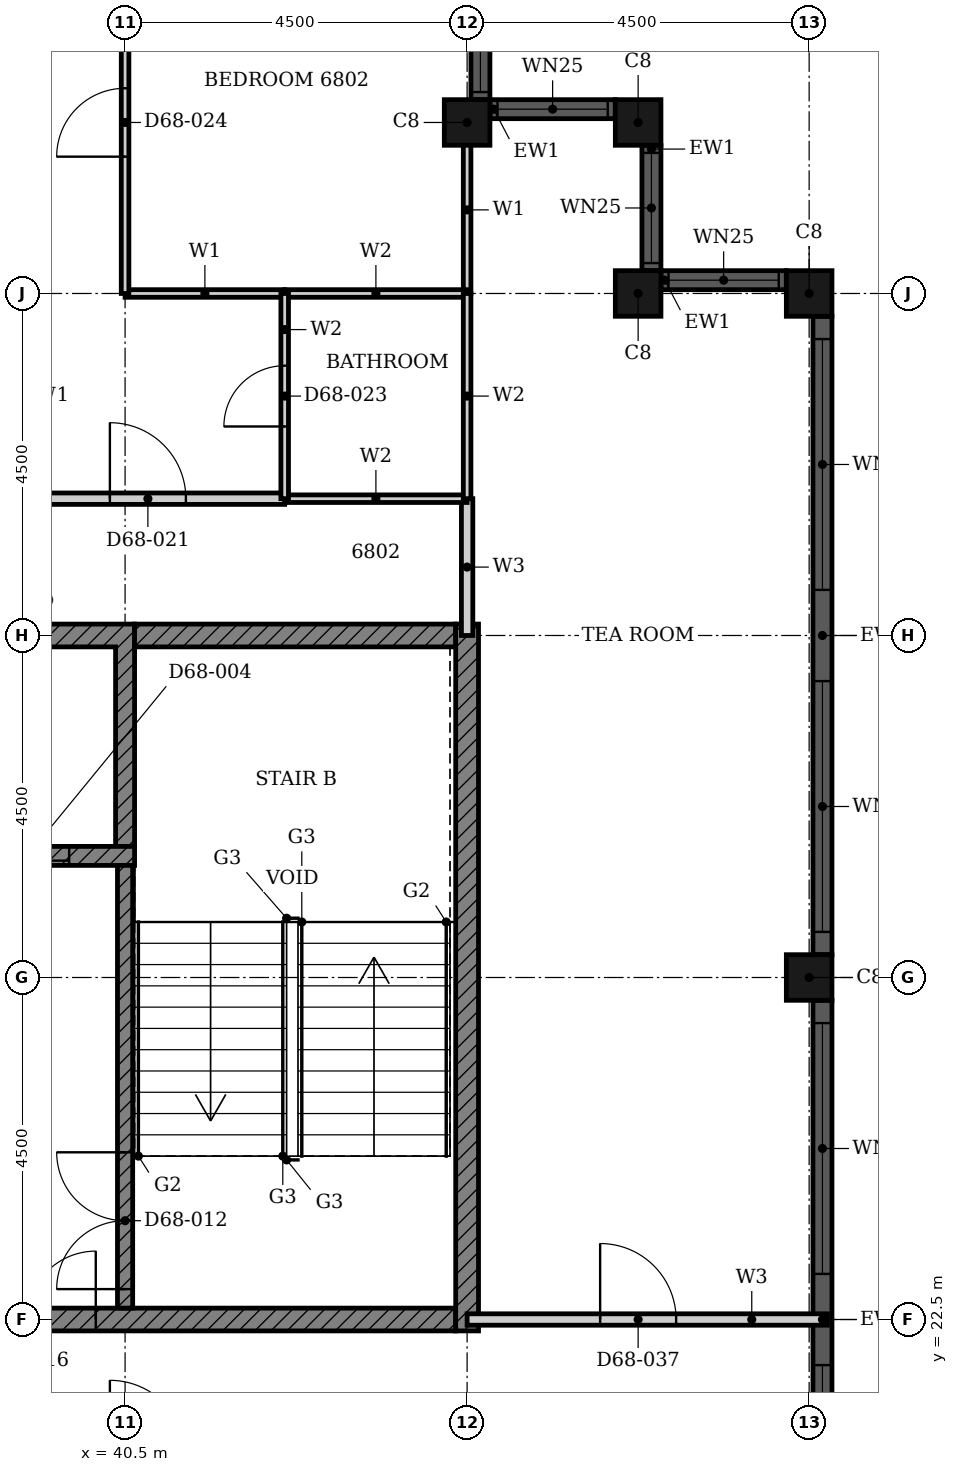
"""IFC4 building model, lengths in metres.
Left out: names, types, materials, properties, quantities, classifications, styles, units other than length and angle.
Written with IfcOpenShell. Run it as: python <this file> out.ifc"""

import sys

from ifc_helpers import new_model, si_unit, direction, frame, frame_2d, origin, origin_2d, place, context, subcontext, project, spatial, polyline, rectangle, hollow_rectangle, outline, extrude, element, fill, save


model = new_model("IFC4")
c1 = context("Model", 3, precision=1e-05, world=origin(), true_north=direction((0.0, 1.0)))
c2 = subcontext(c1, "Body", "Model", "MODEL_VIEW")
j1 = project(units=[si_unit("LENGTHUNIT", "METRE"), si_unit("PLANEANGLEUNIT", "RADIAN")], contexts=[c1])
p1 = place(None, origin())
s1 = spatial("IfcSite", under=j1, at=p1, CompositionType="ELEMENT")
p2 = place(p1, origin())
s2 = spatial("IfcBuilding", under=s1, at=p2, CompositionType="ELEMENT")
p3 = place(p2, frame((0.0, 0.0, 267.5)))
s3 = spatial("IfcBuildingStorey", under=s2, at=p3, CompositionType="ELEMENT", Elevation=267.5)
for number, where, z_axis, x_axis in (
    (1, (49.5, 27.0, 0.0), (0.0, 0.0, 1.0), (1.0, 0.0, 0.0)),
    (2, (49.5, 36.0, 0.0), (0.0, 0.0, 1.0), (1.0, 0.0, 0.0)),
    (3, (47.25, 36.0, 0.0), (0.0, 0.0, 1.0), (1.0, 0.0, 0.0)),
    (4, (47.25, 38.25, 0.0), (0.0, 0.0, 1.0), (1.0, 0.0, 0.0)),
    (5, (45.0, 38.25, 0.0), (0.0, 0.0, 1.0), (1.0, 0.0, 0.0)),
):
    element("IfcColumn", number, at=place(p3, frame(where, z_axis=z_axis, x_axis=x_axis)), inside=s3, PredefinedType="COLUMN", context=c2, shape_type="SweptSolid", body=[
        extrude(hollow_rectangle(XDim=0.6, YDim=0.6, WallThickness=0.02, at=origin_2d()), origin(), (0.0, 0.0, 1.0), 3.7),
    ])
p4 = place(p3, frame((49.675, 18.3, 0.0), z_axis=(0.0, 0.0, 1.0), x_axis=(0.0, 1.0, 0.0)))
e6 = element("IfcWall", 6, at=p4, inside=s3, PredefinedType="SOLIDWALL", context=c2, shape_type="SweptSolid", body=[
    extrude(rectangle(XDim=8.4, YDim=0.25, at=frame_2d((4.2, 0.0))), origin(), (0.0, 0.0, 1.0), 3.7),
])
p5 = place(p4, frame((0.3, 0.0, 0.45)))
e7 = element("IfcOpeningElement", 7, at=p5, cuts=e6, PredefinedType="OPENING", context=c2, shape_type="SweptSolid", body=[
    extrude(rectangle(XDim=3.3, YDim=2.3, at=frame_2d((1.65, 1.15))), frame((0.0, 0.135, 0.0), z_axis=(0.0, -1.0, 0.0), x_axis=(1.0, 0.0, 0.0)), (0.0, 0.0, 1.0), 0.27),
])
p6 = place(p4, frame((4.8, 0.0, 0.45)))
e8 = element("IfcOpeningElement", 8, at=p6, cuts=e6, PredefinedType="OPENING", context=c2, shape_type="SweptSolid", body=[
    extrude(rectangle(XDim=3.3, YDim=2.3, at=frame_2d((1.65, 1.15))), frame((0.0, 0.135, 0.0), z_axis=(0.0, -1.0, 0.0), x_axis=(1.0, 0.0, 0.0)), (0.0, 0.0, 1.0), 0.27),
])
p7 = place(p3, frame((49.675, 27.3, 0.0), z_axis=(0.0, 0.0, 1.0), x_axis=(0.0, 1.0, 0.0)))
e9 = element("IfcWall", 9, at=p7, inside=s3, PredefinedType="SOLIDWALL", context=c2, shape_type="SweptSolid", body=[
    extrude(rectangle(XDim=8.4, YDim=0.25, at=frame_2d((4.2, 0.0))), origin(), (0.0, 0.0, 1.0), 3.7),
])
p8 = place(p7, frame((0.3, 0.0, 0.45)))
e10 = element("IfcOpeningElement", 10, at=p8, cuts=e9, PredefinedType="OPENING", context=c2, shape_type="SweptSolid", body=[
    extrude(rectangle(XDim=3.3, YDim=2.3, at=frame_2d((1.65, 1.15))), frame((0.0, 0.135, 0.0), z_axis=(0.0, -1.0, 0.0), x_axis=(1.0, 0.0, 0.0)), (0.0, 0.0, 1.0), 0.27),
])
p9 = place(p7, frame((4.8, 0.0, 0.45)))
e11 = element("IfcOpeningElement", 11, at=p9, cuts=e9, PredefinedType="OPENING", context=c2, shape_type="SweptSolid", body=[
    extrude(rectangle(XDim=3.3, YDim=2.3, at=frame_2d((1.65, 1.15))), frame((0.0, 0.135, 0.0), z_axis=(0.0, -1.0, 0.0), x_axis=(1.0, 0.0, 0.0)), (0.0, 0.0, 1.0), 0.27),
])
p10 = place(p3, frame((49.2, 36.175, 0.0), z_axis=(0.0, 0.0, 1.0), x_axis=(-1.0, 0.0, 0.0)))
e12 = element("IfcWall", 12, at=p10, inside=s3, PredefinedType="SOLIDWALL", context=c2, shape_type="SweptSolid", body=[
    extrude(rectangle(XDim=1.65, YDim=0.25, at=frame_2d((0.825, 0.0))), origin(), (0.0, 0.0, 1.0), 3.7),
])
p11 = place(p10, frame((0.1, 0.0, 0.9)))
e13 = element("IfcOpeningElement", 13, at=p11, cuts=e12, PredefinedType="OPENING", context=c2, shape_type="SweptSolid", body=[
    extrude(rectangle(XDim=1.45, YDim=1.85, at=frame_2d((0.725, 0.925))), frame((0.0, 0.135, 0.0), z_axis=(0.0, -1.0, 0.0), x_axis=(1.0, 0.0, 0.0)), (0.0, 0.0, 1.0), 0.27),
])
p12 = place(p3, frame((47.425, 36.3, 0.0), z_axis=(0.0, 0.0, 1.0), x_axis=(0.0, 1.0, 0.0)))
e14 = element("IfcWall", 14, at=p12, inside=s3, PredefinedType="SOLIDWALL", context=c2, shape_type="SweptSolid", body=[
    extrude(rectangle(XDim=1.65, YDim=0.25, at=frame_2d((0.825, 0.0))), origin(), (0.0, 0.0, 1.0), 3.7),
])
p13 = place(p12, frame((0.1, 0.0, 0.9)))
e15 = element("IfcOpeningElement", 15, at=p13, cuts=e14, PredefinedType="OPENING", context=c2, shape_type="SweptSolid", body=[
    extrude(rectangle(XDim=1.45, YDim=1.85, at=frame_2d((0.725, 0.925))), frame((0.0, 0.135, 0.0), z_axis=(0.0, -1.0, 0.0), x_axis=(1.0, 0.0, 0.0)), (0.0, 0.0, 1.0), 0.27),
])
p14 = place(p3, frame((46.95, 38.425, 0.0), z_axis=(0.0, 0.0, 1.0), x_axis=(-1.0, 0.0, 0.0)))
e16 = element("IfcWall", 16, at=p14, inside=s3, PredefinedType="SOLIDWALL", context=c2, shape_type="SweptSolid", body=[
    extrude(rectangle(XDim=1.65, YDim=0.25, at=frame_2d((0.825, 0.0))), origin(), (0.0, 0.0, 1.0), 3.7),
])
p15 = place(p14, frame((0.1, 0.0, 0.9)))
e17 = element("IfcOpeningElement", 17, at=p15, cuts=e16, PredefinedType="OPENING", context=c2, shape_type="SweptSolid", body=[
    extrude(rectangle(XDim=1.45, YDim=1.85, at=frame_2d((0.725, 0.925))), frame((0.0, 0.135, 0.0), z_axis=(0.0, -1.0, 0.0), x_axis=(1.0, 0.0, 0.0)), (0.0, 0.0, 1.0), 0.27),
])
p16 = place(p3, frame((45.175, 38.55, 0.0), z_axis=(0.0, 0.0, 1.0), x_axis=(0.0, 1.0, 0.0)))
e18 = element("IfcWall", 18, at=p16, inside=s3, PredefinedType="SOLIDWALL", context=c2, shape_type="SweptSolid", body=[
    extrude(rectangle(XDim=1.65, YDim=0.25, at=frame_2d((0.825, 0.0))), origin(), (0.0, 0.0, 1.0), 3.7),
])
p17 = place(p16, frame((0.1, 0.0, 0.9)))
e19 = element("IfcOpeningElement", 19, at=p17, cuts=e18, PredefinedType="OPENING", context=c2, shape_type="SweptSolid", body=[
    extrude(rectangle(XDim=1.45, YDim=1.85, at=frame_2d((0.725, 0.925))), frame((0.0, 0.135, 0.0), z_axis=(0.0, -1.0, 0.0), x_axis=(1.0, 0.0, 0.0)), (0.0, 0.0, 1.0), 0.27),
])
p18 = place(p3, origin())
e20 = element("IfcWall", 20, at=p18, inside=s3, PredefinedType="SHEAR", context=c2, shape_type="SweptSolid", body=[
    extrude(outline(polyline([(37.803, 28.725), (38.053, 28.725), (38.053, 31.35), (40.375, 31.35), (40.375, 28.725), (40.625, 28.725), (40.625, 31.65), (37.803, 31.65), (37.803, 28.725)])), origin(), (0.0, 0.0, 1.0), 3.4),
])
p19 = place(p3, frame((30.339, 22.5, 0.0), z_axis=(0.0, 0.0, 1.0), x_axis=(1.0, 0.0, 0.0)))
e21 = element("IfcWall", 21, at=p19, inside=s3, PredefinedType="SHEAR", context=c2, shape_type="SweptSolid", body=[
    extrude(rectangle(XDim=14.511, YDim=0.3, at=frame_2d((7.255, 0.0))), origin(), (0.0, 0.0, 1.0), 3.4),
])
p20 = place(p19, frame((7.975, 0.0, 0.0)))
e22 = element("IfcOpeningElement", 22, at=p20, cuts=e21, PredefinedType="OPENING", context=c2, shape_type="SweptSolid", body=[
    extrude(rectangle(XDim=1.8, YDim=2.1, at=frame_2d((0.9, 1.05))), frame((0.0, 0.16, 0.0), z_axis=(0.0, -1.0, 0.0), x_axis=(1.0, 0.0, 0.0)), (0.0, 0.0, 1.0), 0.32),
])
p21 = place(p3, frame((40.625, 31.5, 0.0), z_axis=(0.0, 0.0, 1.0), x_axis=(1.0, 0.0, 0.0)))
e23 = element("IfcWall", 23, at=p21, inside=s3, PredefinedType="SHEAR", context=c2, shape_type="SweptSolid", body=[
    extrude(rectangle(XDim=4.225, YDim=0.3, at=frame_2d((2.113, 0.0))), origin(), (0.0, 0.0, 1.0), 3.4),
])
p22 = place(p3, frame((45.0, 22.35, 0.0), z_axis=(0.0, 0.0, 1.0), x_axis=(0.0, 1.0, 0.0)))
e24 = element("IfcWall", 24, at=p22, inside=s3, PredefinedType="SHEAR", context=c2, shape_type="SweptSolid", body=[
    extrude(rectangle(XDim=9.3, YDim=0.3, at=frame_2d((4.65, 0.0))), origin(), (0.0, 0.0, 1.0), 3.4),
])
p23 = place(p3, frame((24.947, 28.6, 0.0), z_axis=(0.0, 0.0, 1.0), x_axis=(1.0, 0.0, 0.0)))
e25 = element("IfcWall", 25, at=p23, inside=s3, PredefinedType="SHEAR", context=c2, shape_type="SweptSolid", body=[
    extrude(rectangle(XDim=15.678, YDim=0.25, at=frame_2d((7.839, 0.0))), origin(), (0.0, 0.0, 1.0), 3.4),
])
p24 = place(p23, frame((3.432, 0.0, 0.0)))
e26 = element("IfcOpeningElement", 26, at=p24, cuts=e25, PredefinedType="OPENING", context=c2, shape_type="SweptSolid", body=[
    extrude(rectangle(XDim=1.1, YDim=2.1, at=frame_2d((0.55, 1.05))), frame((0.0, 0.135, 0.0), z_axis=(0.0, -1.0, 0.0), x_axis=(1.0, 0.0, 0.0)), (0.0, 0.0, 1.0), 0.27),
])
p25 = place(p23, frame((13.718, 0.0, 0.0)))
e27 = element("IfcOpeningElement", 27, at=p25, cuts=e25, PredefinedType="OPENING", context=c2, shape_type="SweptSolid", body=[
    extrude(rectangle(XDim=1.1, YDim=2.1, at=frame_2d((0.55, 1.05))), frame((0.0, 0.135, 0.0), z_axis=(0.0, -1.0, 0.0), x_axis=(1.0, 0.0, 0.0)), (0.0, 0.0, 1.0), 0.27),
])
p26 = place(p23, frame((0.961, 0.0, 0.0)))
e28 = element("IfcOpeningElement", 28, at=p26, cuts=e25, PredefinedType="OPENING", context=c2, shape_type="SweptSolid", body=[
    extrude(rectangle(XDim=0.9, YDim=2.1, at=frame_2d((0.45, 1.05))), frame((0.0, 0.135, 0.0), z_axis=(0.0, -1.0, 0.0), x_axis=(1.0, 0.0, 0.0)), (0.0, 0.0, 1.0), 0.27),
])
p27 = place(p23, frame((8.675, 0.0, 0.0)))
e29 = element("IfcOpeningElement", 29, at=p27, cuts=e25, PredefinedType="OPENING", context=c2, shape_type="SweptSolid", body=[
    extrude(rectangle(XDim=0.9, YDim=2.1, at=frame_2d((0.45, 1.05))), frame((0.0, 0.135, 0.0), z_axis=(0.0, -1.0, 0.0), x_axis=(1.0, 0.0, 0.0)), (0.0, 0.0, 1.0), 0.27),
])
p28 = place(p3, frame((40.5, 22.65, 0.0), z_axis=(0.0, 0.0, 1.0), x_axis=(0.0, 1.0, 0.0)))
e30 = element("IfcWall", 30, at=p28, inside=s3, PredefinedType="SHEAR", context=c2, shape_type="SweptSolid", body=[
    extrude(rectangle(XDim=5.825, YDim=0.2, at=frame_2d((2.913, 0.0))), origin(), (0.0, 0.0, 1.0), 3.4),
])
p29 = place(p28, frame((0.25, 0.0, 0.0)))
e31 = element("IfcOpeningElement", 31, at=p29, cuts=e30, PredefinedType="OPENING", context=c2, shape_type="SweptSolid", body=[
    extrude(rectangle(XDim=1.8, YDim=2.1, at=frame_2d((0.9, 1.05))), frame((0.0, 0.11, 0.0), z_axis=(0.0, -1.0, 0.0), x_axis=(1.0, 0.0, 0.0)), (0.0, 0.0, 1.0), 0.22),
])
p30 = place(p3, frame((45.0, 22.5, 0.0), z_axis=(0.0, 0.0, 1.0), x_axis=(1.0, 0.0, 0.0)))
e32 = element("IfcWall", 32, at=p30, inside=s3, PredefinedType="PARTITIONING", context=c2, shape_type="SweptSolid", body=[
    extrude(rectangle(XDim=4.74, YDim=0.15, at=frame_2d((2.37, 0.0))), origin(), (0.0, 0.0, 1.0), 3.4),
])
p31 = place(p30, frame((1.75, 0.0, 0.0)))
e33 = element("IfcOpeningElement", 33, at=p31, cuts=e32, PredefinedType="OPENING", context=c2, shape_type="SweptSolid", body=[
    extrude(rectangle(XDim=1.0, YDim=2.1, at=frame_2d((0.5, 1.05))), frame((0.0, 0.085, 0.0), z_axis=(0.0, -1.0, 0.0), x_axis=(1.0, 0.0, 0.0)), (0.0, 0.0, 1.0), 0.17),
])
p32 = place(p3, frame((20.4, 33.3, 0.0), z_axis=(0.0, 0.0, 1.0), x_axis=(1.0, 0.0, 0.0)))
e34 = element("IfcWall", 34, at=p32, inside=s3, PredefinedType="PARTITIONING", context=c2, shape_type="SweptSolid", body=[
    extrude(rectangle(XDim=22.2, YDim=0.15, at=frame_2d((11.1, 0.0))), origin(), (0.0, 0.0, 1.0), 3.4),
])
p33 = place(p32, frame((1.3, 0.0, 0.0)))
e35 = element("IfcOpeningElement", 35, at=p33, cuts=e34, PredefinedType="OPENING", context=c2, shape_type="SweptSolid", body=[
    extrude(rectangle(XDim=1.0, YDim=2.2, at=frame_2d((0.5, 1.1))), frame((0.0, 0.085, 0.0), z_axis=(0.0, -1.0, 0.0), x_axis=(1.0, 0.0, 0.0)), (0.0, 0.0, 1.0), 0.17),
])
p34 = place(p32, frame((10.6, 0.0, 0.0)))
e36 = element("IfcOpeningElement", 36, at=p34, cuts=e34, PredefinedType="OPENING", context=c2, shape_type="SweptSolid", body=[
    extrude(rectangle(XDim=1.0, YDim=2.1, at=frame_2d((0.5, 1.05))), frame((0.0, 0.085, 0.0), z_axis=(0.0, -1.0, 0.0), x_axis=(1.0, 0.0, 0.0)), (0.0, 0.0, 1.0), 0.17),
])
p35 = place(p32, frame((19.9, 0.0, 0.0)))
e37 = element("IfcOpeningElement", 37, at=p35, cuts=e34, PredefinedType="OPENING", context=c2, shape_type="SweptSolid", body=[
    extrude(rectangle(XDim=1.0, YDim=2.2, at=frame_2d((0.5, 1.1))), frame((0.0, 0.085, 0.0), z_axis=(0.0, -1.0, 0.0), x_axis=(1.0, 0.0, 0.0)), (0.0, 0.0, 1.0), 0.17),
])
p36 = place(p3, frame((45.0, 31.5, 0.0), z_axis=(0.0, 0.0, 1.0), x_axis=(0.0, 1.0, 0.0)))
e38 = element("IfcWall", 38, at=p36, inside=s3, PredefinedType="PARTITIONING", context=c2, shape_type="SweptSolid", body=[
    extrude(rectangle(XDim=1.8, YDim=0.15, at=frame_2d((0.9, 0.0))), origin(), (0.0, 0.0, 1.0), 3.4),
])
p37 = place(p3, frame((40.5, 36.0, 0.0), z_axis=(0.0, 0.0, 1.0), x_axis=(1.0, 0.0, 0.0)))
e39 = element("IfcWall", 39, at=p37, inside=s3, PredefinedType="PARTITIONING", context=c2, shape_type="SweptSolid", body=[
    extrude(rectangle(XDim=2.1, YDim=0.1, at=frame_2d((1.05, 0.0))), origin(), (0.0, 0.0, 1.0), 3.4),
])
p38 = place(p3, frame((40.5, 36.0, 0.0), z_axis=(0.0, 0.0, 1.0), x_axis=(0.0, 1.0, 0.0)))
e40 = element("IfcWall", 40, at=p38, inside=s3, PredefinedType="PARTITIONING", context=c2, shape_type="SweptSolid", body=[
    extrude(rectangle(XDim=4.74, YDim=0.1, at=frame_2d((2.37, 0.0))), origin(), (0.0, 0.0, 1.0), 3.4),
])
p39 = place(p38, frame((1.8, 0.0, 0.0)))
e41 = element("IfcOpeningElement", 41, at=p39, cuts=e40, PredefinedType="OPENING", context=c2, shape_type="SweptSolid", body=[
    extrude(rectangle(XDim=0.9, YDim=2.1, at=frame_2d((0.45, 1.05))), frame((0.0, 0.06, 0.0), z_axis=(0.0, -1.0, 0.0), x_axis=(1.0, 0.0, 0.0)), (0.0, 0.0, 1.0), 0.12),
])
p40 = place(p3, frame((45.0, 36.0, 0.0), z_axis=(0.0, 0.0, 1.0), x_axis=(0.0, 1.0, 0.0)))
e42 = element("IfcWall", 42, at=p40, inside=s3, PredefinedType="PARTITIONING", context=c2, shape_type="SweptSolid", body=[
    extrude(rectangle(XDim=2.2, YDim=0.1, at=frame_2d((1.1, 0.0))), origin(), (0.0, 0.0, 1.0), 3.4),
])
for number, where, z_axis, x_axis in (
    (43, (42.6, 33.3, 0.0), (0.0, 0.0, 1.0), (1.0, 0.0, 0.0)),
    (44, (42.6, 36.0, 0.0), (0.0, 0.0, 1.0), (1.0, 0.0, 0.0)),
):
    element("IfcWall", number, at=place(p3, frame(where, z_axis=z_axis, x_axis=x_axis)), inside=s3, PredefinedType="PARTITIONING", context=c2, shape_type="SweptSolid", body=[
        extrude(rectangle(XDim=2.4, YDim=0.1, at=frame_2d((1.2, 0.0))), origin(), (0.0, 0.0, 1.0), 3.4),
    ])
p41 = place(p3, frame((42.6, 33.3, 0.0), z_axis=(0.0, 0.0, 1.0), x_axis=(0.0, 1.0, 0.0)))
e45 = element("IfcWall", 45, at=p41, inside=s3, PredefinedType="PARTITIONING", context=c2, shape_type="SweptSolid", body=[
    extrude(rectangle(XDim=2.7, YDim=0.1, at=frame_2d((1.35, 0.0))), origin(), (0.0, 0.0, 1.0), 3.4),
])
p42 = place(p41, frame((0.95, 0.0, 0.0)))
e46 = element("IfcOpeningElement", 46, at=p42, cuts=e45, PredefinedType="OPENING", context=c2, shape_type="SweptSolid", body=[
    extrude(rectangle(XDim=0.8, YDim=2.1, at=frame_2d((0.4, 1.05))), frame((0.0, 0.06, 0.0), z_axis=(0.0, -1.0, 0.0), x_axis=(1.0, 0.0, 0.0)), (0.0, 0.0, 1.0), 0.12),
])
p43 = place(p3, frame((45.0, 33.3, 0.0), z_axis=(0.0, 0.0, 1.0), x_axis=(0.0, 1.0, 0.0)))
e47 = element("IfcWall", 47, at=p43, inside=s3, PredefinedType="PARTITIONING", context=c2, shape_type="SweptSolid", body=[
    extrude(rectangle(XDim=2.7, YDim=0.1, at=frame_2d((1.35, 0.0))), origin(), (0.0, 0.0, 1.0), 3.4),
])
p44 = place(p5, origin())
e48 = element("IfcWindow", 48, at=p44, inside=s3, PartitioningType="SINGLE_PANEL", PredefinedType="WINDOW", context=c2, shape_type="SweptSolid", body=[
    extrude(rectangle(XDim=3.3, YDim=2.3, at=frame_2d((1.65, 1.15))), frame((0.0, 0.03, 0.0), z_axis=(0.0, -1.0, 0.0), x_axis=(1.0, 0.0, 0.0)), (0.0, 0.0, 1.0), 0.06),
])
fill(e7, e48)
p45 = place(p6, origin())
e49 = element("IfcWindow", 49, at=p45, inside=s3, PartitioningType="SINGLE_PANEL", PredefinedType="WINDOW", context=c2, shape_type="SweptSolid", body=[
    extrude(rectangle(XDim=3.3, YDim=2.3, at=frame_2d((1.65, 1.15))), frame((0.0, 0.03, 0.0), z_axis=(0.0, -1.0, 0.0), x_axis=(1.0, 0.0, 0.0)), (0.0, 0.0, 1.0), 0.06),
])
fill(e8, e49)
p46 = place(p8, origin())
e50 = element("IfcWindow", 50, at=p46, inside=s3, PartitioningType="SINGLE_PANEL", PredefinedType="WINDOW", context=c2, shape_type="SweptSolid", body=[
    extrude(rectangle(XDim=3.3, YDim=2.3, at=frame_2d((1.65, 1.15))), frame((0.0, 0.03, 0.0), z_axis=(0.0, -1.0, 0.0), x_axis=(1.0, 0.0, 0.0)), (0.0, 0.0, 1.0), 0.06),
])
fill(e10, e50)
p47 = place(p9, origin())
e51 = element("IfcWindow", 51, at=p47, inside=s3, PartitioningType="SINGLE_PANEL", PredefinedType="WINDOW", context=c2, shape_type="SweptSolid", body=[
    extrude(rectangle(XDim=3.3, YDim=2.3, at=frame_2d((1.65, 1.15))), frame((0.0, 0.03, 0.0), z_axis=(0.0, -1.0, 0.0), x_axis=(1.0, 0.0, 0.0)), (0.0, 0.0, 1.0), 0.06),
])
fill(e11, e51)
p48 = place(p11, origin())
e52 = element("IfcWindow", 52, at=p48, inside=s3, PartitioningType="SINGLE_PANEL", PredefinedType="WINDOW", context=c2, shape_type="SweptSolid", body=[
    extrude(rectangle(XDim=1.45, YDim=1.85, at=frame_2d((0.725, 0.925))), frame((0.0, 0.03, 0.0), z_axis=(0.0, -1.0, 0.0), x_axis=(1.0, 0.0, 0.0)), (0.0, 0.0, 1.0), 0.06),
])
fill(e13, e52)
p49 = place(p13, origin())
e53 = element("IfcWindow", 53, at=p49, inside=s3, PartitioningType="SINGLE_PANEL", PredefinedType="WINDOW", context=c2, shape_type="SweptSolid", body=[
    extrude(rectangle(XDim=1.45, YDim=1.85, at=frame_2d((0.725, 0.925))), frame((0.0, 0.03, 0.0), z_axis=(0.0, -1.0, 0.0), x_axis=(1.0, 0.0, 0.0)), (0.0, 0.0, 1.0), 0.06),
])
fill(e15, e53)
p50 = place(p15, origin())
e54 = element("IfcWindow", 54, at=p50, inside=s3, PartitioningType="SINGLE_PANEL", PredefinedType="WINDOW", context=c2, shape_type="SweptSolid", body=[
    extrude(rectangle(XDim=1.45, YDim=1.85, at=frame_2d((0.725, 0.925))), frame((0.0, 0.03, 0.0), z_axis=(0.0, -1.0, 0.0), x_axis=(1.0, 0.0, 0.0)), (0.0, 0.0, 1.0), 0.06),
])
fill(e17, e54)
p51 = place(p17, origin())
e55 = element("IfcWindow", 55, at=p51, inside=s3, PartitioningType="SINGLE_PANEL", PredefinedType="WINDOW", context=c2, shape_type="SweptSolid", body=[
    extrude(rectangle(XDim=1.45, YDim=1.85, at=frame_2d((0.725, 0.925))), frame((0.0, 0.03, 0.0), z_axis=(0.0, -1.0, 0.0), x_axis=(1.0, 0.0, 0.0)), (0.0, 0.0, 1.0), 0.06),
])
fill(e19, e55)
p52 = place(p25, origin())
e56 = element("IfcDoor", 56, at=p52, inside=s3, OperationType="DOUBLE_DOOR_SLIDING", PredefinedType="DOOR", context=c2, shape_type="SweptSolid", body=[
    extrude(rectangle(XDim=1.1, YDim=2.1, at=frame_2d((0.55, 1.05))), frame((0.0, 0.025, 0.0), z_axis=(0.0, -1.0, 0.0), x_axis=(1.0, 0.0, 0.0)), (0.0, 0.0, 1.0), 0.05),
])
fill(e27, e56)
p53 = place(p29, origin())
e57 = element("IfcDoor", 57, at=p53, inside=s3, OperationType="DOUBLE_DOOR_SINGLE_SWING", PredefinedType="DOOR", context=c2, shape_type="SweptSolid", body=[
    extrude(rectangle(XDim=1.8, YDim=2.1, at=frame_2d((0.9, 1.05))), frame((0.0, 0.025, 0.0), z_axis=(0.0, -1.0, 0.0), x_axis=(1.0, 0.0, 0.0)), (0.0, 0.0, 1.0), 0.05),
])
fill(e31, e57)
p54 = place(p20, origin())
e58 = element("IfcDoor", 58, at=p54, inside=s3, OperationType="DOUBLE_DOOR_SINGLE_SWING", PredefinedType="DOOR", context=c2, shape_type="SweptSolid", body=[
    extrude(rectangle(XDim=1.8, YDim=2.1, at=frame_2d((0.9, 1.05))), frame((0.0, 0.025, 0.0), z_axis=(0.0, -1.0, 0.0), x_axis=(1.0, 0.0, 0.0)), (0.0, 0.0, 1.0), 0.05),
])
fill(e22, e58)
p55 = place(p35, origin())
e59 = element("IfcDoor", 59, at=p55, inside=s3, OperationType="SINGLE_SWING_RIGHT", PredefinedType="DOOR", context=c2, shape_type="SweptSolid", body=[
    extrude(rectangle(XDim=1.0, YDim=2.2, at=frame_2d((0.5, 1.1))), frame((0.0, 0.025, 0.0), z_axis=(0.0, -1.0, 0.0), x_axis=(1.0, 0.0, 0.0)), (0.0, 0.0, 1.0), 0.05),
])
fill(e37, e59)
p56 = place(p42, origin())
e60 = element("IfcDoor", 60, at=p56, inside=s3, OperationType="SINGLE_SWING_LEFT", PredefinedType="DOOR", context=c2, shape_type="SweptSolid", body=[
    extrude(rectangle(XDim=0.8, YDim=2.1, at=frame_2d((0.4, 1.05))), frame((0.0, 0.025, 0.0), z_axis=(0.0, -1.0, 0.0), x_axis=(1.0, 0.0, 0.0)), (0.0, 0.0, 1.0), 0.05),
])
fill(e46, e60)
p57 = place(p39, origin())
e61 = element("IfcDoor", 61, at=p57, inside=s3, OperationType="SINGLE_SWING_LEFT", PredefinedType="DOOR", context=c2, shape_type="SweptSolid", body=[
    extrude(rectangle(XDim=0.9, YDim=2.1, at=frame_2d((0.45, 1.05))), frame((0.0, 0.025, 0.0), z_axis=(0.0, -1.0, 0.0), x_axis=(1.0, 0.0, 0.0)), (0.0, 0.0, 1.0), 0.05),
])
fill(e41, e61)
p58 = place(p31, origin())
e62 = element("IfcDoor", 62, at=p58, inside=s3, OperationType="SINGLE_SWING_LEFT", PredefinedType="DOOR", context=c2, shape_type="SweptSolid", body=[
    extrude(rectangle(XDim=1.0, YDim=2.1, at=frame_2d((0.5, 1.05))), frame((0.0, 0.025, 0.0), z_axis=(0.0, -1.0, 0.0), x_axis=(1.0, 0.0, 0.0)), (0.0, 0.0, 1.0), 0.05),
])
fill(e33, e62)
save(model, sys.argv[1])
